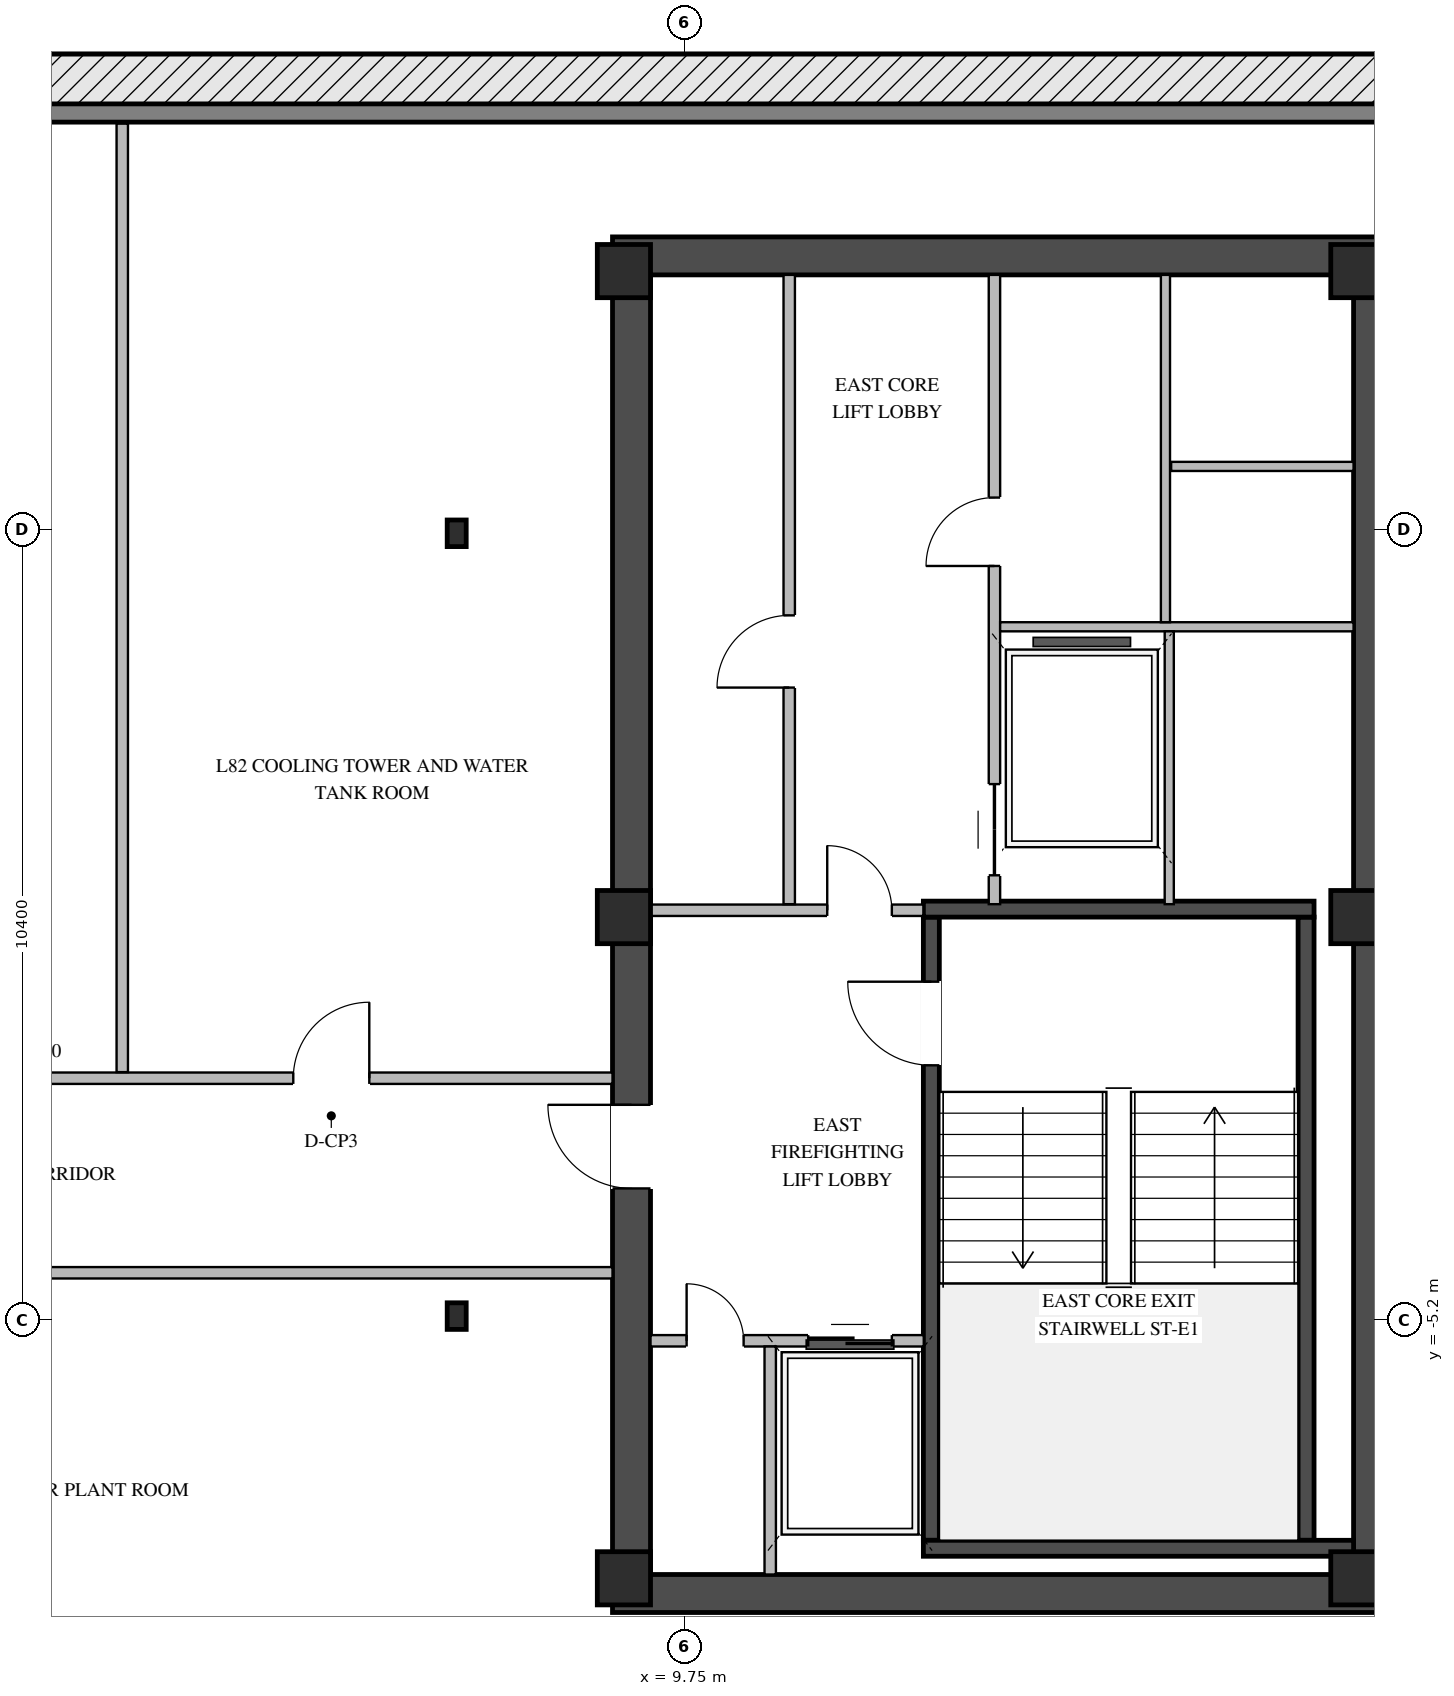
"""IFC4 building model, lengths in metres.
Left out: names, types, materials, properties, quantities, classifications, styles, units other than length and angle.
Written with IfcOpenShell. Run it as: python <this file> out.ifc"""

import sys

from ifc_helpers import new_model, si_unit, direction, frame, frame_2d, origin, origin_2d, place, context, subcontext, project, spatial, rectangle, i_section, extrude, element, fill, save


model = new_model("IFC4")
c1 = context("Model", 3, precision=1e-05, world=origin(), true_north=direction((0.0, 1.0)))
c2 = subcontext(c1, "Body", "Model", "MODEL_VIEW")
j1 = project(units=[si_unit("LENGTHUNIT", "METRE"), si_unit("PLANEANGLEUNIT", "RADIAN")], contexts=[c1])
p1 = place(None, origin())
s1 = spatial("IfcSite", under=j1, at=p1, CompositionType="ELEMENT")
p2 = place(p1, origin())
s2 = spatial("IfcBuilding", under=s1, at=p2, CompositionType="ELEMENT")
p3 = place(p2, frame((0.0, 0.0, 301.35)))
s3 = spatial("IfcBuildingStorey", under=s2, at=p3, CompositionType="ELEMENT", Elevation=301.35)
for number, where, z_axis, x_axis in (
    (1, (8.8, -8.8, 0.0), (0.0, 0.0, 1.0), (1.0, 0.0, 0.0)),
    (2, (8.8, 8.8, 0.0), (0.0, 0.0, 1.0), (1.0, 0.0, 0.0)),
):
    element("IfcWall", number, at=place(p3, frame(where, z_axis=z_axis, x_axis=x_axis)), inside=s3, PredefinedType="SHEAR", context=c2, shape_type="SweptSolid", body=[
        extrude(rectangle(XDim=10.25, YDim=0.5, at=frame_2d((5.125, 0.0))), origin(), (0.0, 0.0, 1.0), 3.35),
    ])
p4 = place(p3, frame((9.05, -8.55, 0.0), z_axis=(0.0, 0.0, 1.0), x_axis=(0.0, 1.0, 0.0)))
e3 = element("IfcWall", 3, at=p4, inside=s3, PredefinedType="SHEAR", context=c2, shape_type="SweptSolid", body=[
    extrude(rectangle(XDim=17.1, YDim=0.5, at=frame_2d((8.55, 0.0))), origin(), (0.0, 0.0, 1.0), 3.35),
])
p5 = place(p4, frame((5.08, 0.0, 0.0)))
e4 = element("IfcOpeningElement", 4, at=p5, cuts=e3, PredefinedType="OPENING", context=c2, shape_type="SweptSolid", body=[
    extrude(rectangle(XDim=1.1, YDim=2.08, at=frame_2d((0.55, 1.04))), frame((0.0, 0.26, 0.0), z_axis=(0.0, -1.0, 0.0), x_axis=(1.0, 0.0, 0.0)), (0.0, 0.0, 1.0), 0.52),
])
p6 = place(p3, frame((18.8, -8.55, 0.0), z_axis=(0.0, 0.0, 1.0), x_axis=(0.0, 1.0, 0.0)))
e5 = element("IfcWall", 5, at=p6, inside=s3, PredefinedType="SHEAR", context=c2, shape_type="SweptSolid", body=[
    extrude(rectangle(XDim=17.1, YDim=0.5, at=frame_2d((8.55, 0.0))), origin(), (0.0, 0.0, 1.0), 3.35),
])
p7 = place(p3, frame((12.995, -8.1, 0.0), z_axis=(0.0, 0.0, 1.0), x_axis=(0.0, 1.0, 0.0)))
e6 = element("IfcWall", 6, at=p7, inside=s3, PredefinedType="SHEAR", context=c2, shape_type="SweptSolid", body=[
    extrude(rectangle(XDim=8.2, YDim=0.21, at=frame_2d((4.1, 0.0))), origin(), (0.0, 0.0, 1.0), 3.35),
])
p8 = place(p7, frame((6.25, 0.0, 0.0)))
e7 = element("IfcOpeningElement", 7, at=p8, cuts=e6, PredefinedType="OPENING", context=c2, shape_type="SweptSolid", body=[
    extrude(rectangle(XDim=1.1, YDim=2.15, at=frame_2d((0.55, 1.075))), frame((0.0, 0.115, 0.0), z_axis=(0.0, -1.0, 0.0), x_axis=(1.0, 0.0, 0.0)), (0.0, 0.0, 1.0), 0.23),
])
p9 = place(p3, frame((17.925, -8.1, 0.0), z_axis=(0.0, 0.0, 1.0), x_axis=(0.0, 1.0, 0.0)))
e8 = element("IfcWall", 8, at=p9, inside=s3, PredefinedType="SHEAR", context=c2, shape_type="SweptSolid", body=[
    extrude(rectangle(XDim=8.2, YDim=0.21, at=frame_2d((4.1, 0.0))), origin(), (0.0, 0.0, 1.0), 3.35),
])
p10 = place(p3, frame((12.89, -8.205, 0.0), z_axis=(0.0, 0.0, 1.0), x_axis=(1.0, 0.0, 0.0)))
e9 = element("IfcWall", 9, at=p10, inside=s3, PredefinedType="SHEAR", context=c2, shape_type="SweptSolid", body=[
    extrude(rectangle(XDim=5.66, YDim=0.21, at=frame_2d((2.83, 0.0))), origin(), (0.0, 0.0, 1.0), 3.35),
])
p11 = place(p3, frame((18.03, 0.205, 0.0), z_axis=(0.0, 0.0, 1.0), x_axis=(-1.0, 0.0, 0.0)))
e10 = element("IfcWall", 10, at=p11, inside=s3, PredefinedType="SHEAR", context=c2, shape_type="SweptSolid", body=[
    extrude(rectangle(XDim=5.14, YDim=0.21, at=frame_2d((2.57, 0.0))), origin(), (0.0, 0.0, 1.0), 3.35),
])
for number, where, z_axis, x_axis in (
    (11, (8.95, -8.6, 0.0), (0.0, 0.0, 1.0), (1.0, 0.0, 0.0)),
    (12, (8.95, 0.1, 0.0), (0.0, 0.0, 1.0), (1.0, 0.0, 0.0)),
    (13, (8.95, 8.6, 0.0), (0.0, 0.0, 1.0), (1.0, 0.0, 0.0)),
    (14, (18.6, -8.6, 0.0), (0.0, 0.0, 1.0), (1.0, 0.0, 0.0)),
    (15, (18.6, 0.1, 0.0), (0.0, 0.0, 1.0), (1.0, 0.0, 0.0)),
    (16, (18.6, 8.6, 0.0), (0.0, 0.0, 1.0), (1.0, 0.0, 0.0)),
):
    element("IfcColumn", number, at=place(p3, frame(where, z_axis=z_axis, x_axis=x_axis)), inside=s3, PredefinedType="COLUMN", context=c2, shape_type="SweptSolid", body=[
        extrude(rectangle(XDim=0.7, YDim=0.7, at=origin_2d()), origin(), (0.0, 0.0, 1.0), 3.6),
    ])
for number, where, z_axis, x_axis in (
    (17, (6.75, -5.15, 0.0), (0.0, 0.0, 1.0), (1.0, 0.0, 0.0)),
    (18, (6.75, 5.15, 0.0), (0.0, 0.0, 1.0), (1.0, 0.0, 0.0)),
):
    element("IfcColumn", number, at=place(p3, frame(where, z_axis=z_axis, x_axis=x_axis)), inside=s3, PredefinedType="COLUMN", context=c2, shape_type="SweptSolid", body=[
        extrude(i_section(OverallWidth=0.25, OverallDepth=0.35, WebThickness=0.01, FlangeThickness=0.012, at=origin_2d()), origin(), (0.0, 0.0, 1.0), 3.6),
    ])
p12 = place(p3, frame((21.16, 10.68, 0.0), z_axis=(0.0, 0.0, 1.0), x_axis=(-1.0, 0.0, 0.0)))
e19 = element("IfcWall", 19, at=p12, inside=s3, PredefinedType="STANDARD", context=c2, shape_type="SweptSolid", body=[
    extrude(rectangle(XDim=41.32, YDim=0.24, at=frame_2d((20.66, 0.0))), origin(), (0.0, 0.0, 1.0), 3.33),
])
p13 = place(p3, frame((-20.35, 11.58, 0.0), z_axis=(0.0, 0.0, 1.0), x_axis=(1.0, 0.0, 0.0)))
e20 = element("IfcWall", 20, at=p13, inside=s3, PredefinedType="PARAPET", context=c2, shape_type="SweptSolid", body=[
    extrude(rectangle(XDim=42.7, YDim=0.25, at=frame_2d((21.35, 0.0))), origin(), (0.0, 0.0, 1.0), 1.2),
])
p14 = place(p3, frame((9.3, -5.475, 0.0), z_axis=(0.0, 0.0, 1.0), x_axis=(1.0, 0.0, 0.0)))
e21 = element("IfcWall", 21, at=p14, inside=s3, PredefinedType="STANDARD", context=c2, shape_type="SweptSolid", body=[
    extrude(rectangle(XDim=3.595, YDim=0.15, at=frame_2d((1.797, 0.0))), origin(), (0.0, 0.0, 1.0), 3.33),
])
p15 = place(p14, frame((2.075, 0.0, 0.0)))
e22 = element("IfcOpeningElement", 22, at=p15, cuts=e21, PredefinedType="OPENING", context=c2, shape_type="SweptSolid", body=[
    extrude(rectangle(XDim=1.1, YDim=2.15, at=frame_2d((0.55, 1.075))), frame((0.0, 0.085, 0.0), z_axis=(0.0, -1.0, 0.0), x_axis=(1.0, 0.0, 0.0)), (0.0, 0.0, 1.0), 0.17),
])
p16 = place(p14, frame((0.475, 0.0, 0.0)))
e23 = element("IfcOpeningElement", 23, at=p16, cuts=e21, PredefinedType="OPENING", context=c2, shape_type="SweptSolid", body=[
    extrude(rectangle(XDim=0.75, YDim=2.05, at=frame_2d((0.375, 1.025))), frame((0.0, 0.085, 0.0), z_axis=(0.0, -1.0, 0.0), x_axis=(1.0, 0.0, 0.0)), (0.0, 0.0, 1.0), 0.17),
])
p17 = place(p3, frame((10.875, -8.55, 0.0), z_axis=(0.0, 0.0, 1.0), x_axis=(0.0, 1.0, 0.0)))
e24 = element("IfcWall", 24, at=p17, inside=s3, PredefinedType="STANDARD", context=c2, shape_type="SweptSolid", body=[
    extrude(rectangle(XDim=3.0, YDim=0.15, at=frame_2d((1.5, 0.0))), origin(), (0.0, 0.0, 1.0), 3.33),
])
p18 = place(p3, frame((9.3, 0.19, 0.0), z_axis=(0.0, 0.0, 1.0), x_axis=(1.0, 0.0, 0.0)))
e25 = element("IfcWall", 25, at=p18, inside=s3, PredefinedType="STANDARD", context=c2, shape_type="SweptSolid", body=[
    extrude(rectangle(XDim=3.59, YDim=0.15, at=frame_2d((1.795, 0.0))), origin(), (0.0, 0.0, 1.0), 2.825),
])
p19 = place(p18, frame((2.325, 0.0, 0.0)))
e26 = element("IfcOpeningElement", 26, at=p19, cuts=e25, PredefinedType="OPENING", context=c2, shape_type="SweptSolid", body=[
    extrude(rectangle(XDim=0.85, YDim=2.04, at=frame_2d((0.425, 1.02))), frame((0.0, 0.085, 0.0), z_axis=(0.0, -1.0, 0.0), x_axis=(1.0, 0.0, 0.0)), (0.0, 0.0, 1.0), 0.17),
])
p20 = place(p3, frame((11.125, 0.27, 0.0), z_axis=(0.0, 0.0, 1.0), x_axis=(0.0, 1.0, 0.0)))
e27 = element("IfcWall", 27, at=p20, inside=s3, PredefinedType="STANDARD", context=c2, shape_type="SweptSolid", body=[
    extrude(rectangle(XDim=8.28, YDim=0.15, at=frame_2d((4.14, 0.0))), origin(), (0.0, 0.0, 1.0), 3.33),
])
p21 = place(p20, frame((2.85, 0.0, 0.0)))
e28 = element("IfcOpeningElement", 28, at=p21, cuts=e27, PredefinedType="OPENING", context=c2, shape_type="SweptSolid", body=[
    extrude(rectangle(XDim=0.95, YDim=2.05, at=frame_2d((0.475, 1.025))), frame((0.0, 0.085, 0.0), z_axis=(0.0, -1.0, 0.0), x_axis=(1.0, 0.0, 0.0)), (0.0, 0.0, 1.0), 0.17),
])
p22 = place(p3, frame((13.825, 0.27, 0.0), z_axis=(0.0, 0.0, 1.0), x_axis=(0.0, 1.0, 0.0)))
e29 = element("IfcWall", 29, at=p22, inside=s3, PredefinedType="STANDARD", context=c2, shape_type="SweptSolid", body=[
    extrude(rectangle(XDim=8.28, YDim=0.15, at=frame_2d((4.14, 0.0))), origin(), (0.0, 0.0, 1.0), 3.33),
])
p23 = place(p22, frame((4.45, 0.0, 0.0)))
e30 = element("IfcOpeningElement", 30, at=p23, cuts=e29, PredefinedType="OPENING", context=c2, shape_type="SweptSolid", body=[
    extrude(rectangle(XDim=0.9, YDim=2.05, at=frame_2d((0.45, 1.025))), frame((0.0, 0.085, 0.0), z_axis=(0.0, -1.0, 0.0), x_axis=(1.0, 0.0, 0.0)), (0.0, 0.0, 1.0), 0.17),
])
p24 = place(p22, frame((0.38, 0.0, 0.0)))
e31 = element("IfcOpeningElement", 31, at=p24, cuts=e29, PredefinedType="OPENING", context=c2, shape_type="SweptSolid", body=[
    extrude(rectangle(XDim=1.2, YDim=2.1, at=frame_2d((0.6, 1.05))), frame((0.0, 0.085, 0.0), z_axis=(0.0, -1.0, 0.0), x_axis=(1.0, 0.0, 0.0)), (0.0, 0.0, 1.0), 0.17),
])
p25 = place(p3, frame((13.9, 3.92, 0.0), z_axis=(0.0, 0.0, 1.0), x_axis=(1.0, 0.0, 0.0)))
e32 = element("IfcWall", 32, at=p25, inside=s3, PredefinedType="STANDARD", context=c2, shape_type="SweptSolid", body=[
    extrude(rectangle(XDim=4.65, YDim=0.12, at=frame_2d((2.325, 0.0))), origin(), (0.0, 0.0, 1.0), 3.33),
])
p26 = place(p3, frame((16.15, 6.03, 0.0), z_axis=(0.0, 0.0, 1.0), x_axis=(1.0, 0.0, 0.0)))
e33 = element("IfcWall", 33, at=p26, inside=s3, PredefinedType="STANDARD", context=c2, shape_type="SweptSolid", body=[
    extrude(rectangle(XDim=2.4, YDim=0.12, at=frame_2d((1.2, 0.0))), origin(), (0.0, 0.0, 1.0), 3.33),
])
p27 = place(p3, frame((16.075, 3.98, 0.0), z_axis=(0.0, 0.0, 1.0), x_axis=(0.0, 1.0, 0.0)))
e34 = element("IfcWall", 34, at=p27, inside=s3, PredefinedType="STANDARD", context=c2, shape_type="SweptSolid", body=[
    extrude(rectangle(XDim=4.57, YDim=0.12, at=frame_2d((2.285, 0.0))), origin(), (0.0, 0.0, 1.0), 3.33),
])
p28 = place(p3, frame((16.125, 0.27, 0.0), z_axis=(0.0, 0.0, 1.0), x_axis=(0.0, 1.0, 0.0)))
e35 = element("IfcWall", 35, at=p28, inside=s3, PredefinedType="STANDARD", context=c2, shape_type="SweptSolid", body=[
    extrude(rectangle(XDim=3.59, YDim=0.12, at=frame_2d((1.795, 0.0))), origin(), (0.0, 0.0, 1.0), 3.33),
])
p29 = place(p3, frame((-8.8, -2.02, 0.0), z_axis=(0.0, 0.0, 1.0), x_axis=(1.0, 0.0, 0.0)))
e36 = element("IfcWall", 36, at=p29, inside=s3, PredefinedType="STANDARD", context=c2, shape_type="SweptSolid", body=[
    extrude(rectangle(XDim=17.6, YDim=0.15, at=frame_2d((8.8, 0.0))), origin(), (0.0, 0.0, 1.0), 3.33),
])
p30 = place(p29, frame((4.6, 0.0, 0.0)))
e37 = element("IfcOpeningElement", 37, at=p30, cuts=e36, PredefinedType="OPENING", context=c2, shape_type="SweptSolid", body=[
    extrude(rectangle(XDim=1.0, YDim=2.02, at=frame_2d((0.5, 1.01))), frame((0.0, 0.085, 0.0), z_axis=(0.0, -1.0, 0.0), x_axis=(1.0, 0.0, 0.0)), (0.0, 0.0, 1.0), 0.17),
])
p31 = place(p29, frame((13.4, 0.0, 0.0)))
e38 = element("IfcOpeningElement", 38, at=p31, cuts=e36, PredefinedType="OPENING", context=c2, shape_type="SweptSolid", body=[
    extrude(rectangle(XDim=1.0, YDim=2.02, at=frame_2d((0.5, 1.01))), frame((0.0, 0.085, 0.0), z_axis=(0.0, -1.0, 0.0), x_axis=(1.0, 0.0, 0.0)), (0.0, 0.0, 1.0), 0.17),
])
p32 = place(p3, frame((2.35, -1.94, 0.0), z_axis=(0.0, 0.0, 1.0), x_axis=(0.0, 1.0, 0.0)))
e39 = element("IfcWall", 39, at=p32, inside=s3, PredefinedType="STANDARD", context=c2, shape_type="SweptSolid", body=[
    extrude(rectangle(XDim=12.48, YDim=0.15, at=frame_2d((6.24, 0.0))), origin(), (0.0, 0.0, 1.0), 3.33),
])
p33 = place(p3, frame((-8.8, -4.58, 0.0), z_axis=(0.0, 0.0, 1.0), x_axis=(1.0, 0.0, 0.0)))
e40 = element("IfcWall", 40, at=p33, inside=s3, PredefinedType="STANDARD", context=c2, shape_type="SweptSolid", body=[
    extrude(rectangle(XDim=17.6, YDim=0.15, at=frame_2d((8.8, 0.0))), origin(), (0.0, 0.0, 1.0), 3.33),
])
p34 = place(p33, frame((4.6, 0.0, 0.0)))
e41 = element("IfcOpeningElement", 41, at=p34, cuts=e40, PredefinedType="OPENING", context=c2, shape_type="SweptSolid", body=[
    extrude(rectangle(XDim=1.0, YDim=2.02, at=frame_2d((0.5, 1.01))), frame((0.0, 0.085, 0.0), z_axis=(0.0, -1.0, 0.0), x_axis=(1.0, 0.0, 0.0)), (0.0, 0.0, 1.0), 0.17),
])
p35 = place(p8, origin())
e42 = element("IfcDoor", 42, at=p35, inside=s3, OperationType="SINGLE_SWING_RIGHT", PredefinedType="DOOR", context=c2, shape_type="SweptSolid", body=[
    extrude(rectangle(XDim=1.1, YDim=2.15, at=frame_2d((0.55, 1.075))), frame((0.0, 0.025, 0.0), z_axis=(0.0, -1.0, 0.0), x_axis=(1.0, 0.0, 0.0)), (0.0, 0.0, 1.0), 0.05),
])
fill(e7, e42)
p36 = place(p15, origin())
e43 = element("IfcDoor", 43, at=p36, inside=s3, OperationType="DOUBLE_DOOR_SLIDING", PredefinedType="DOOR", context=c2, shape_type="SweptSolid", body=[
    extrude(rectangle(XDim=1.1, YDim=2.15, at=frame_2d((0.55, 1.075))), frame((0.0, 0.025, 0.0), z_axis=(0.0, -1.0, 0.0), x_axis=(1.0, 0.0, 0.0)), (0.0, 0.0, 1.0), 0.05),
])
fill(e22, e43)
p37 = place(p16, origin())
e44 = element("IfcDoor", 44, at=p37, inside=s3, OperationType="SINGLE_SWING_LEFT", PredefinedType="DOOR", context=c2, shape_type="SweptSolid", body=[
    extrude(rectangle(XDim=0.75, YDim=2.05, at=frame_2d((0.375, 1.025))), frame((0.0, 0.025, 0.0), z_axis=(0.0, -1.0, 0.0), x_axis=(1.0, 0.0, 0.0)), (0.0, 0.0, 1.0), 0.05),
])
fill(e23, e44)
p38 = place(p19, origin())
e45 = element("IfcDoor", 45, at=p38, inside=s3, OperationType="SINGLE_SWING_LEFT", PredefinedType="DOOR", context=c2, shape_type="SweptSolid", body=[
    extrude(rectangle(XDim=0.85, YDim=2.04, at=frame_2d((0.425, 1.02))), frame((0.0, 0.025, 0.0), z_axis=(0.0, -1.0, 0.0), x_axis=(1.0, 0.0, 0.0)), (0.0, 0.0, 1.0), 0.05),
])
fill(e26, e45)
p39 = place(p5, origin())
e46 = element("IfcDoor", 46, at=p39, inside=s3, OperationType="SINGLE_SWING_RIGHT", PredefinedType="DOOR", context=c2, shape_type="SweptSolid", body=[
    extrude(rectangle(XDim=1.1, YDim=2.08, at=frame_2d((0.55, 1.04))), frame((0.0, -0.155, 0.0), z_axis=(0.0, -1.0, 0.0), x_axis=(1.0, 0.0, 0.0)), (0.0, 0.0, 1.0), 0.05),
])
fill(e4, e46)
p40 = place(p21, origin())
e47 = element("IfcDoor", 47, at=p40, inside=s3, OperationType="SINGLE_SWING_LEFT", PredefinedType="DOOR", context=c2, shape_type="SweptSolid", body=[
    extrude(rectangle(XDim=0.95, YDim=2.05, at=frame_2d((0.475, 1.025))), frame((0.0, 0.025, 0.0), z_axis=(0.0, -1.0, 0.0), x_axis=(1.0, 0.0, 0.0)), (0.0, 0.0, 1.0), 0.05),
])
fill(e28, e47)
p41 = place(p23, origin())
e48 = element("IfcDoor", 48, at=p41, inside=s3, OperationType="SINGLE_SWING_LEFT", PredefinedType="DOOR", context=c2, shape_type="SweptSolid", body=[
    extrude(rectangle(XDim=0.9, YDim=2.05, at=frame_2d((0.45, 1.025))), frame((0.0, 0.025, 0.0), z_axis=(0.0, -1.0, 0.0), x_axis=(1.0, 0.0, 0.0)), (0.0, 0.0, 1.0), 0.05),
])
fill(e30, e48)
p42 = place(p24, origin())
e49 = element("IfcDoor", 49, at=p42, inside=s3, OperationType="DOUBLE_DOOR_SLIDING", PredefinedType="DOOR", context=c2, shape_type="SweptSolid", body=[
    extrude(rectangle(XDim=1.2, YDim=2.1, at=frame_2d((0.6, 1.05))), frame((0.0, 0.025, 0.0), z_axis=(0.0, -1.0, 0.0), x_axis=(1.0, 0.0, 0.0)), (0.0, 0.0, 1.0), 0.05),
])
fill(e31, e49)
p43 = place(p31, origin())
e50 = element("IfcDoor", 50, at=p43, inside=s3, OperationType="SINGLE_SWING_RIGHT", PredefinedType="DOOR", context=c2, shape_type="SweptSolid", body=[
    extrude(rectangle(XDim=1.0, YDim=2.02, at=frame_2d((0.5, 1.01))), frame((0.0, 0.025, 0.0), z_axis=(0.0, -1.0, 0.0), x_axis=(1.0, 0.0, 0.0)), (0.0, 0.0, 1.0), 0.05),
])
fill(e38, e50)
save(model, sys.argv[1])
